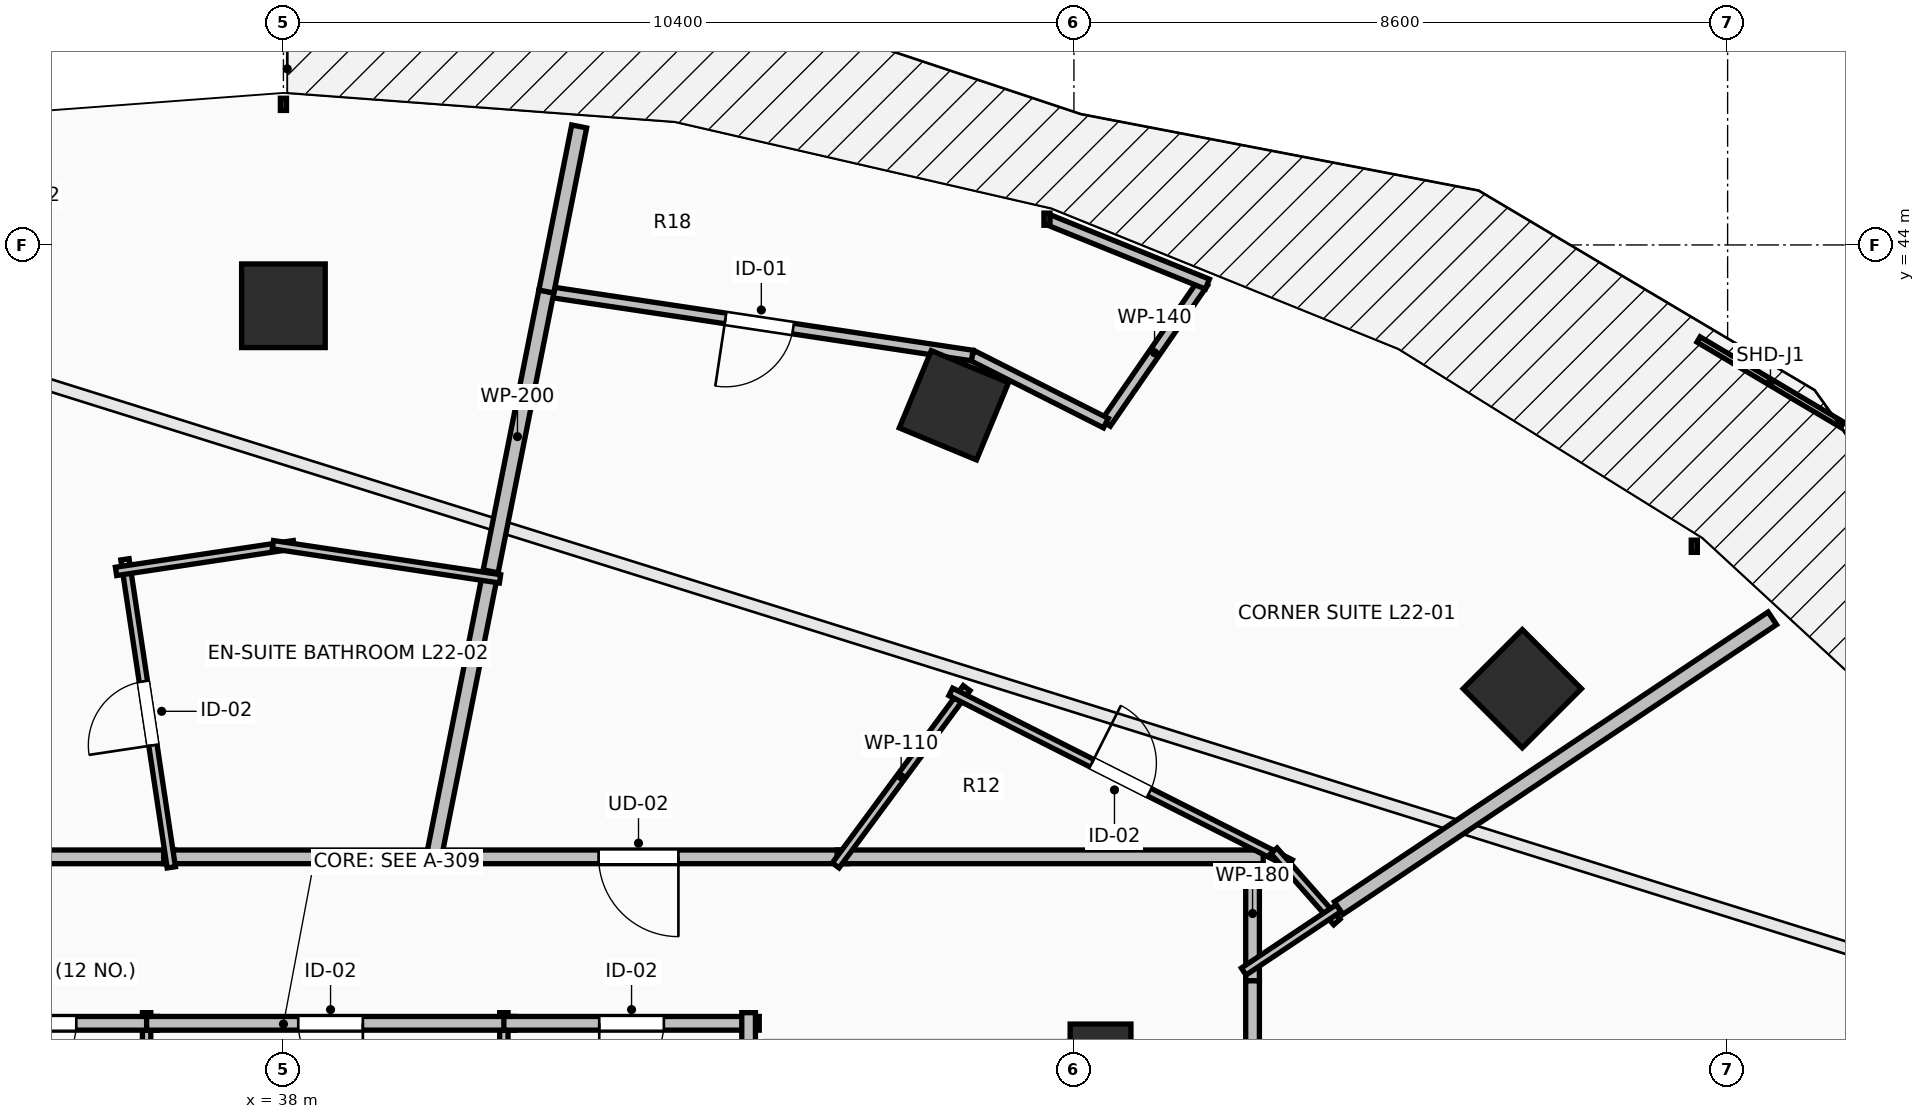
"""IFC4 building model, lengths in metres.
Left out: names, types, materials, properties, quantities, classifications, styles, units other than length and angle.
Written with IfcOpenShell. Run it as: python <this file> out.ifc"""

import sys

from ifc_helpers import new_model, si_unit, direction, frame, frame_2d, origin, origin_2d, place, context, subcontext, project, spatial, rectangle, extrude, element, fill, save


model = new_model("IFC4")
c1 = context("Model", 3, precision=1e-05, world=origin(), true_north=direction((0.0, 1.0)))
c2 = subcontext(c1, "Body", "Model", "MODEL_VIEW")
j1 = project(units=[si_unit("LENGTHUNIT", "METRE"), si_unit("PLANEANGLEUNIT", "RADIAN")], contexts=[c1])
p1 = place(None, origin())
s1 = spatial("IfcSite", under=j1, at=p1, CompositionType="ELEMENT")
p2 = place(p1, origin())
s2 = spatial("IfcBuilding", under=s1, at=p2, CompositionType="ELEMENT")
p3 = place(p2, frame((0.0, 0.0, 85.8)))
s3 = spatial("IfcBuildingStorey", under=s2, at=p3, CompositionType="ELEMENT", Elevation=85.8)
for number, where, z_axis, x_axis in (
    (1, (54.299, 38.162, 0.0), (0.0, 0.0, 1.0), (0.707, 0.707, 0.0)),
    (2, (46.821, 41.891, 0.0), (0.0, 0.0, 1.0), (0.383, 0.924, 0.0)),
    (3, (38.0, 43.2, 0.0), (0.0, 0.0, 1.0), (0.0, 1.0, 0.0)),
):
    element("IfcColumn", number, at=place(p3, frame(where, z_axis=z_axis, x_axis=x_axis)), inside=s3, PredefinedType="COLUMN", context=c2, shape_type="SweptSolid", body=[
        extrude(rectangle(XDim=1.1, YDim=1.1, at=origin_2d()), origin(), (0.0, 0.0, 1.0), 3.5),
    ])
p4 = place(p3, frame((48.75, 33.15, 0.0), z_axis=(0.0, 0.0, 1.0), x_axis=(1.0, 0.0, 0.0)))
e4 = element("IfcColumn", 4, at=p4, inside=s3, PredefinedType="PILASTER", context=c2, shape_type="SweptSolid", body=[
    extrude(rectangle(XDim=0.8, YDim=1.2, at=origin_2d()), origin(), (0.0, 0.0, 1.0), 3.5),
])
p5 = place(p3, frame((36.2, 30.34, 0.0), z_axis=(0.0, 0.0, 1.0), x_axis=(0.0, 1.0, 0.0)))
e5 = element("IfcWall", 5, at=p5, inside=s3, PredefinedType="PARTITIONING", context=c2, shape_type="SweptSolid", body=[
    extrude(rectangle(XDim=3.56, YDim=0.11, at=frame_2d((1.78, 0.0))), origin(), (0.0, 0.0, 1.0), 2.432),
])
p6 = place(p3, frame((36.34, 33.76, 0.0), z_axis=(0.0, 0.0, 1.0), x_axis=(-1.0, 0.0, 0.0)))
e6 = element("IfcWall", 6, at=p6, inside=s3, PredefinedType="PARTITIONING", context=c2, shape_type="SweptSolid", body=[
    extrude(rectangle(XDim=2.98, YDim=0.18, at=frame_2d((1.49, 0.0))), origin(), (0.0, 0.0, 1.0), 3.24),
])
p7 = place(p6, frame((1.065, 0.0, 0.0)))
e7 = element("IfcOpeningElement", 7, at=p7, cuts=e6, PredefinedType="OPENING", context=c2, shape_type="SweptSolid", body=[
    extrude(rectangle(XDim=0.85, YDim=2.1, at=frame_2d((0.425, 1.05))), frame((0.0, 0.105, 0.0), z_axis=(0.0, -1.0, 0.0), x_axis=(1.0, 0.0, 0.0)), (0.0, 0.0, 1.0), 0.21),
])
p8 = place(p3, frame((40.9, 30.34, 0.0), z_axis=(0.0, 0.0, 1.0), x_axis=(0.0, 1.0, 0.0)))
e8 = element("IfcWall", 8, at=p8, inside=s3, PredefinedType="PARTITIONING", context=c2, shape_type="SweptSolid", body=[
    extrude(rectangle(XDim=3.56, YDim=0.11, at=frame_2d((1.78, 0.0))), origin(), (0.0, 0.0, 1.0), 3.24),
])
p9 = place(p3, frame((41.04, 33.76, 0.0), z_axis=(0.0, 0.0, 1.0), x_axis=(-1.0, 0.0, 0.0)))
e9 = element("IfcWall", 9, at=p9, inside=s3, PredefinedType="PARTITIONING", context=c2, shape_type="SweptSolid", body=[
    extrude(rectangle(XDim=4.84, YDim=0.18, at=frame_2d((2.42, 0.0))), origin(), (0.0, 0.0, 1.0), 3.24),
])
p10 = place(p9, frame((1.995, 0.0, 0.0)))
e10 = element("IfcOpeningElement", 10, at=p10, cuts=e9, PredefinedType="OPENING", context=c2, shape_type="SweptSolid", body=[
    extrude(rectangle(XDim=0.85, YDim=2.1, at=frame_2d((0.425, 1.05))), frame((0.0, 0.105, 0.0), z_axis=(0.0, -1.0, 0.0), x_axis=(1.0, 0.0, 0.0)), (0.0, 0.0, 1.0), 0.21),
])
p11 = place(p3, frame((44.26, 33.76, 0.0), z_axis=(0.0, 0.0, 1.0), x_axis=(-1.0, 0.0, 0.0)))
e11 = element("IfcWall", 11, at=p11, inside=s3, PredefinedType="PARTITIONING", context=c2, shape_type="SweptSolid", body=[
    extrude(rectangle(XDim=3.36, YDim=0.18, at=frame_2d((1.68, 0.0))), origin(), (0.0, 0.0, 1.0), 3.24),
])
p12 = place(p11, frame((1.255, 0.0, 0.0)))
e12 = element("IfcOpeningElement", 12, at=p12, cuts=e11, PredefinedType="OPENING", context=c2, shape_type="SweptSolid", body=[
    extrude(rectangle(XDim=0.85, YDim=2.1, at=frame_2d((0.425, 1.05))), frame((0.0, 0.105, 0.0), z_axis=(0.0, -1.0, 0.0), x_axis=(1.0, 0.0, 0.0)), (0.0, 0.0, 1.0), 0.21),
])
p13 = place(p3, frame((44.12, 32.97, 0.0), z_axis=(0.0, 0.0, 1.0), x_axis=(0.0, 1.0, 0.0)))
e13 = element("IfcWall", 13, at=p13, inside=s3, PredefinedType="PARTITIONING", context=c2, shape_type="SweptSolid", body=[
    extrude(rectangle(XDim=0.93, YDim=0.18, at=frame_2d((0.465, 0.0))), origin(), (0.0, 0.0, 1.0), 3.24),
])
p14 = place(p3, frame((45.424, 35.95, 0.0), z_axis=(0.0, 0.0, 1.0), x_axis=(-1.0, 0.0, 0.0)))
e14 = element("IfcWall", 14, at=p14, inside=s3, PredefinedType="PARTITIONING", context=c2, shape_type="SweptSolid", body=[
    extrude(rectangle(XDim=5.505, YDim=0.18, at=frame_2d((2.752, 0.0))), origin(), (0.0, 0.0, 1.0), 2.922),
])
p15 = place(p14, frame((2.228, 0.0, 0.0)))
e15 = element("IfcOpeningElement", 15, at=p15, cuts=e14, PredefinedType="OPENING", context=c2, shape_type="SweptSolid", body=[
    extrude(rectangle(XDim=1.05, YDim=2.2, at=frame_2d((0.525, 1.1))), frame((0.0, 0.105, 0.0), z_axis=(0.0, -1.0, 0.0), x_axis=(1.0, 0.0, 0.0)), (0.0, 0.0, 1.0), 0.21),
])
p16 = place(p3, frame((50.75, 34.319, 0.0), z_axis=(0.0, 0.0, 1.0), x_axis=(0.0, 1.0, 0.0)))
e16 = element("IfcWall", 16, at=p16, inside=s3, PredefinedType="PARTITIONING", context=c2, shape_type="SweptSolid", body=[
    extrude(rectangle(XDim=1.771, YDim=0.18, at=frame_2d((0.885, 0.0))), origin(), (0.0, 0.0, 1.0), 2.432),
])
p17 = place(p3, frame((50.89, 35.95, 0.0), z_axis=(0.0, 0.0, 1.0), x_axis=(-1.0, 0.0, 0.0)))
e17 = element("IfcWall", 17, at=p17, inside=s3, PredefinedType="PARTITIONING", context=c2, shape_type="SweptSolid", body=[
    extrude(rectangle(XDim=5.606, YDim=0.18, at=frame_2d((2.803, 0.0))), origin(), (0.0, 0.0, 1.0), 2.432),
])
p18 = place(p3, frame((36.564, 35.95, 0.0), z_axis=(0.0, 0.0, 1.0), x_axis=(-1.0, 0.0, 0.0)))
e18 = element("IfcWall", 18, at=p18, inside=s3, PredefinedType="PARTITIONING", context=c2, shape_type="SweptSolid", body=[
    extrude(rectangle(XDim=5.284, YDim=0.18, at=frame_2d((2.642, 0.0))), origin(), (0.0, 0.0, 1.0), 3.24),
])
p19 = place(p18, frame((2.117, 0.0, 0.0)))
e19 = element("IfcOpeningElement", 19, at=p19, cuts=e18, PredefinedType="OPENING", context=c2, shape_type="SweptSolid", body=[
    extrude(rectangle(XDim=1.05, YDim=2.2, at=frame_2d((0.525, 1.1))), frame((0.0, 0.105, 0.0), z_axis=(0.0, -1.0, 0.0), x_axis=(1.0, 0.0, 0.0)), (0.0, 0.0, 1.0), 0.21),
])
p20 = place(p3, frame((40.059, 35.95, 0.0), z_axis=(0.0, 0.0, 1.0), x_axis=(-1.0, 0.0, 0.0)))
e20 = element("IfcWall", 20, at=p20, inside=s3, PredefinedType="PARTITIONING", context=c2, shape_type="SweptSolid", body=[
    extrude(rectangle(XDim=3.635, YDim=0.18, at=frame_2d((1.817, 0.0))), origin(), (0.0, 0.0, 1.0), 3.24),
])
p21 = place(p3, frame((50.75, 20.779, 0.0), z_axis=(0.0, 0.0, 1.0), x_axis=(0.0, 1.0, 0.0)))
e21 = element("IfcWall", 21, at=p21, inside=s3, PredefinedType="PARTITIONING", context=c2, shape_type="SweptSolid", body=[
    extrude(rectangle(XDim=13.54, YDim=0.18, at=frame_2d((6.77, 0.0))), origin(), (0.0, 0.0, 1.0), 2.432),
])
p22 = place(p21, frame((6.27, 0.0, 0.0)))
e22 = element("IfcOpeningElement", 22, at=p22, cuts=e21, PredefinedType="OPENING", context=c2, shape_type="SweptSolid", body=[
    extrude(rectangle(XDim=1.0, YDim=2.15, at=frame_2d((0.5, 1.075))), frame((0.0, 0.105, 0.0), z_axis=(0.0, -1.0, 0.0), x_axis=(1.0, 0.0, 0.0)), (0.0, 0.0, 1.0), 0.21),
])
p23 = place(p3, frame((45.266, 35.837, 0.0), z_axis=(0.0, 0.0, 1.0), x_axis=(0.594069015324, 0.804414075605, 0.0)))
e23 = element("IfcWall", 23, at=p23, inside=s3, PredefinedType="PARTITIONING", context=c2, shape_type="SweptSolid", body=[
    extrude(rectangle(XDim=2.899, YDim=0.11, at=frame_2d((1.45, 0.0))), origin(), (0.0, 0.0, 1.0), 2.922),
])
p24 = place(p3, frame((46.78, 38.12, 0.0), z_axis=(0.0, 0.0, 1.0), x_axis=(0.892517538434, -0.451012686726, 0.0)))
e24 = element("IfcWall", 24, at=p24, inside=s3, PredefinedType="PARTITIONING", context=c2, shape_type="SweptSolid", body=[
    extrude(rectangle(XDim=5.007, YDim=0.11, at=frame_2d((2.503, 0.0))), origin(), (0.0, 0.0, 1.0), 2.432),
])
p25 = place(p24, frame((2.079, 0.0, 0.0)))
e25 = element("IfcOpeningElement", 25, at=p25, cuts=e24, PredefinedType="OPENING", context=c2, shape_type="SweptSolid", body=[
    extrude(rectangle(XDim=0.85, YDim=2.1, at=frame_2d((0.425, 1.05))), frame((0.0, 0.07, 0.0), z_axis=(0.0, -1.0, 0.0), x_axis=(1.0, 0.0, 0.0)), (0.0, 0.0, 1.0), 0.14),
])
p26 = place(p3, frame((51.031, 36.03, 0.0), z_axis=(0.0, 0.0, 1.0), x_axis=(0.661996266618, -0.749507133377, 0.0)))
e26 = element("IfcWall", 26, at=p26, inside=s3, PredefinedType="PARTITIONING", context=c2, shape_type="SweptSolid", body=[
    extrude(rectangle(XDim=1.25, YDim=0.11, at=frame_2d((0.625, 0.0))), origin(), (0.0, 0.0, 1.0), 2.432),
])
p27 = place(p3, frame((51.882, 35.276, 0.0), z_axis=(0.0, 0.0, 1.0), x_axis=(-0.831374526136, -0.555712513169, 0.0)))
e27 = element("IfcWall", 27, at=p27, inside=s3, PredefinedType="PARTITIONING", context=c2, shape_type="SweptSolid", body=[
    extrude(rectangle(XDim=1.502, YDim=0.11, at=frame_2d((0.751, 0.0))), origin(), (0.0, 0.0, 1.0), 2.922),
])
p28 = place(p3, frame((50.1, 43.507, 0.0), z_axis=(0.0, 0.0, 1.0), x_axis=(-0.568470595976, -0.822703580587, 0.0)))
e28 = element("IfcWall", 28, at=p28, inside=s3, PredefinedType="PARTITIONING", context=c2, shape_type="SweptSolid", body=[
    extrude(rectangle(XDim=2.25, YDim=0.14, at=frame_2d((1.125, 0.0))), origin(), (0.0, 0.0, 1.0), 3.24),
])
p29 = place(p3, frame((48.821, 41.656, 0.0), z_axis=(0.0, 0.0, 1.0), x_axis=(-0.892511395612, 0.451024842668, 0.0)))
e29 = element("IfcWall", 29, at=p29, inside=s3, PredefinedType="PARTITIONING", context=c2, shape_type="SweptSolid", body=[
    extrude(rectangle(XDim=1.971, YDim=0.14, at=frame_2d((0.985, 0.0))), origin(), (0.0, 0.0, 1.0), 3.24),
])
p30 = place(p3, frame((47.062, 42.545, 0.0), z_axis=(0.0, 0.0, 1.0), x_axis=(-0.988869883596, 0.148782906669, 0.0)))
e30 = element("IfcWall", 30, at=p30, inside=s3, PredefinedType="PARTITIONING", context=c2, shape_type="SweptSolid", body=[
    extrude(rectangle(XDim=5.666, YDim=0.14, at=frame_2d((2.833, 0.0))), origin(), (0.0, 0.0, 1.0), 3.24),
])
p31 = place(p30, frame((2.383, 0.0, 0.0)))
e31 = element("IfcOpeningElement", 31, at=p31, cuts=e30, PredefinedType="OPENING", context=c2, shape_type="SweptSolid", body=[
    extrude(rectangle(XDim=0.9, YDim=2.1, at=frame_2d((0.45, 1.05))), frame((0.0, 0.085, 0.0), z_axis=(0.0, -1.0, 0.0), x_axis=(1.0, 0.0, 0.0)), (0.0, 0.0, 1.0), 0.17),
])
p32 = place(p3, frame((50.156, 43.485, 0.0), z_axis=(0.0, 0.0, 1.0), x_axis=(-0.926988791776, 0.375089029327, 0.0)))
e32 = element("IfcWall", 32, at=p32, inside=s3, PredefinedType="PARTITIONING", context=c2, shape_type="SweptSolid", body=[
    extrude(rectangle(XDim=2.263, YDim=0.14, at=frame_2d((1.132, 0.0))), origin(), (0.0, 0.0, 1.0), 3.24),
])
p33 = place(p3, frame((41.459, 43.388, 0.0), z_axis=(0.0, 0.0, 1.0), x_axis=(-0.195187593062, -0.980765926975, 0.0)))
e33 = element("IfcWall", 33, at=p33, inside=s3, PredefinedType="PARTITIONING", context=c2, shape_type="SweptSolid", body=[
    extrude(rectangle(XDim=3.894, YDim=0.2, at=frame_2d((1.947, 0.0))), origin(), (0.0, 0.0, 1.0), 2.677),
])
p34 = place(p3, frame((40.727, 39.706, 0.0), z_axis=(0.0, 0.0, 1.0), x_axis=(-0.195252736913, -0.980752960091, 0.0)))
e34 = element("IfcWall", 34, at=p34, inside=s3, PredefinedType="PARTITIONING", context=c2, shape_type="SweptSolid", body=[
    extrude(rectangle(XDim=3.97, YDim=0.2, at=frame_2d((1.985, 0.0))), origin(), (0.0, 0.0, 1.0), 2.874),
])
p35 = place(p3, frame((51.883, 35.276, 0.0), z_axis=(0.0, 0.0, 1.0), x_axis=(0.831464132421, 0.555578434154, 0.0)))
e35 = element("IfcWall", 35, at=p35, inside=s3, PredefinedType="PARTITIONING", context=c2, shape_type="SweptSolid", body=[
    extrude(rectangle(XDim=6.862, YDim=0.2, at=frame_2d((3.431, 0.0))), origin(), (0.0, 0.0, 1.0), 2.677),
])
p36 = place(p3, frame((41.891, 45.559, 0.0), z_axis=(0.0, 0.0, 1.0), x_axis=(-0.195204079936, -0.980762645688, 0.0)))
e36 = element("IfcWall", 36, at=p36, inside=s3, PredefinedType="PARTITIONING", context=c2, shape_type="SweptSolid", body=[
    extrude(rectangle(XDim=2.214, YDim=0.2, at=frame_2d((1.107, 0.0))), origin(), (0.0, 0.0, 1.0), 3.24),
])
p37 = place(p3, frame((36.525, 35.812, 0.0), z_axis=(0.0, 0.0, 1.0), x_axis=(-0.148739497936, 0.988876413792, 0.0)))
e37 = element("IfcWall", 37, at=p37, inside=s3, PredefinedType="PARTITIONING", context=c2, shape_type="SweptSolid", body=[
    extrude(rectangle(XDim=4.099, YDim=0.11, at=frame_2d((2.049, 0.0))), origin(), (0.0, 0.0, 1.0), 2.874),
])
p38 = place(p37, frame((1.624, 0.0, 0.0)))
e38 = element("IfcOpeningElement", 38, at=p38, cuts=e37, PredefinedType="OPENING", context=c2, shape_type="SweptSolid", body=[
    extrude(rectangle(XDim=0.85, YDim=2.1, at=frame_2d((0.425, 1.05))), frame((0.0, 0.07, 0.0), z_axis=(0.0, -1.0, 0.0), x_axis=(1.0, 0.0, 0.0)), (0.0, 0.0, 1.0), 0.14),
])
p39 = place(p3, frame((35.798, 39.705, 0.0), z_axis=(0.0, 0.0, 1.0), x_axis=(0.988893947493, 0.148622880511, 0.0)))
e39 = element("IfcWall", 39, at=p39, inside=s3, PredefinedType="PARTITIONING", context=c2, shape_type="SweptSolid", body=[
    extrude(rectangle(XDim=2.367, YDim=0.11, at=frame_2d((1.184, 0.0))), origin(), (0.0, 0.0, 1.0), 2.874),
])
p40 = place(p3, frame((37.862, 40.057, 0.0), z_axis=(0.0, 0.0, 1.0), x_axis=(0.988861549405, -0.148838288446, 0.0)))
e40 = element("IfcWall", 40, at=p40, inside=s3, PredefinedType="PARTITIONING", context=c2, shape_type="SweptSolid", body=[
    extrude(rectangle(XDim=3.021, YDim=0.11, at=frame_2d((1.511, 0.0))), origin(), (0.0, 0.0, 1.0), 3.24),
])
p41 = place(p7, origin())
e41 = element("IfcDoor", 41, at=p41, inside=s3, OperationType="SINGLE_SWING_RIGHT", PredefinedType="DOOR", context=c2, shape_type="SweptSolid", body=[
    extrude(rectangle(XDim=0.85, YDim=2.1, at=frame_2d((0.425, 1.05))), frame((0.0, 0.025, 0.0), z_axis=(0.0, -1.0, 0.0), x_axis=(1.0, 0.0, 0.0)), (0.0, 0.0, 1.0), 0.05),
])
fill(e7, e41)
p42 = place(p10, origin())
e42 = element("IfcDoor", 42, at=p42, inside=s3, OperationType="SINGLE_SWING_LEFT", PredefinedType="DOOR", context=c2, shape_type="SweptSolid", body=[
    extrude(rectangle(XDim=0.85, YDim=2.1, at=frame_2d((0.425, 1.05))), frame((0.0, 0.025, 0.0), z_axis=(0.0, -1.0, 0.0), x_axis=(1.0, 0.0, 0.0)), (0.0, 0.0, 1.0), 0.05),
])
fill(e10, e42)
p43 = place(p12, origin())
e43 = element("IfcDoor", 43, at=p43, inside=s3, OperationType="SINGLE_SWING_RIGHT", PredefinedType="DOOR", context=c2, shape_type="SweptSolid", body=[
    extrude(rectangle(XDim=0.85, YDim=2.1, at=frame_2d((0.425, 1.05))), frame((0.0, 0.025, 0.0), z_axis=(0.0, -1.0, 0.0), x_axis=(1.0, 0.0, 0.0)), (0.0, 0.0, 1.0), 0.05),
])
fill(e12, e43)
p44 = place(p15, origin())
e44 = element("IfcDoor", 44, at=p44, inside=s3, OperationType="SINGLE_SWING_LEFT", PredefinedType="DOOR", context=c2, shape_type="SweptSolid", body=[
    extrude(rectangle(XDim=1.05, YDim=2.2, at=frame_2d((0.525, 1.1))), frame((0.0, 0.025, 0.0), z_axis=(0.0, -1.0, 0.0), x_axis=(1.0, 0.0, 0.0)), (0.0, 0.0, 1.0), 0.05),
])
fill(e15, e44)
p45 = place(p25, origin())
e45 = element("IfcDoor", 45, at=p45, inside=s3, OperationType="SINGLE_SWING_LEFT", PredefinedType="DOOR", context=c2, shape_type="SweptSolid", body=[
    extrude(rectangle(XDim=0.85, YDim=2.1, at=frame_2d((0.425, 1.05))), frame((0.0, 0.025, 0.0), z_axis=(0.0, -1.0, 0.0), x_axis=(1.0, 0.0, 0.0)), (0.0, 0.0, 1.0), 0.05),
])
fill(e25, e45)
p46 = place(p31, origin())
e46 = element("IfcDoor", 46, at=p46, inside=s3, OperationType="SINGLE_SWING_RIGHT", PredefinedType="DOOR", context=c2, shape_type="SweptSolid", body=[
    extrude(rectangle(XDim=0.9, YDim=2.1, at=frame_2d((0.45, 1.05))), frame((0.0, 0.025, 0.0), z_axis=(0.0, -1.0, 0.0), x_axis=(1.0, 0.0, 0.0)), (0.0, 0.0, 1.0), 0.05),
])
fill(e31, e46)
p47 = place(p38, origin())
e47 = element("IfcDoor", 47, at=p47, inside=s3, OperationType="SINGLE_SWING_LEFT", PredefinedType="DOOR", context=c2, shape_type="SweptSolid", body=[
    extrude(rectangle(XDim=0.85, YDim=2.1, at=frame_2d((0.425, 1.05))), frame((0.0, 0.025, 0.0), z_axis=(0.0, -1.0, 0.0), x_axis=(1.0, 0.0, 0.0)), (0.0, 0.0, 1.0), 0.05),
])
fill(e38, e47)
save(model, sys.argv[1])
